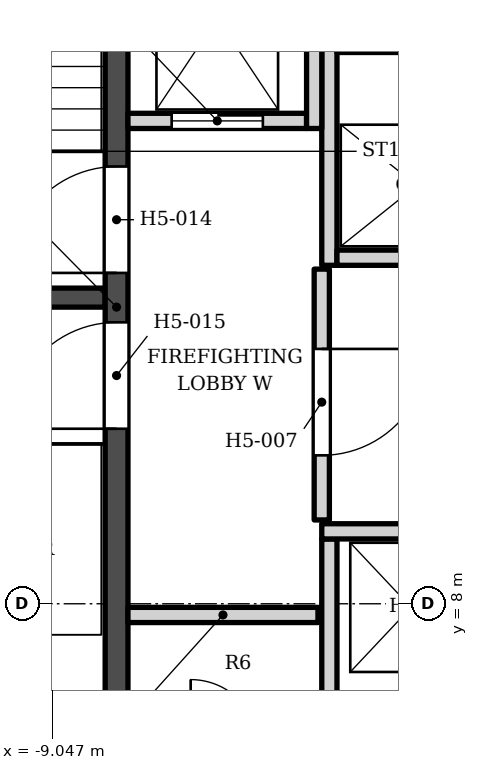
"""IFC4 building model, lengths in metres.
Left out: names, types, materials, properties, quantities, classifications, styles, units other than length and angle.
Written with IfcOpenShell. Run it as: python <this file> out.ifc"""

import sys

from ifc_helpers import new_model, si_unit, direction, frame, frame_2d, origin, place, context, subcontext, project, spatial, rectangle, extrude, element, fill, save


model = new_model("IFC4")
c1 = context("Model", 3, precision=1e-05, world=origin(), true_north=direction((0.0, 1.0)))
c2 = subcontext(c1, "Body", "Model", "MODEL_VIEW")
j1 = project(units=[si_unit("LENGTHUNIT", "METRE"), si_unit("PLANEANGLEUNIT", "RADIAN")], contexts=[c1])
p1 = place(None, origin())
s1 = spatial("IfcSite", under=j1, at=p1, CompositionType="ELEMENT")
p2 = place(p1, origin())
s2 = spatial("IfcBuilding", under=s1, at=p2, CompositionType="ELEMENT")
p3 = place(p2, frame((0.0, 0.0, 91.8)))
s3 = spatial("IfcBuildingStorey", under=s2, at=p3, CompositionType="ELEMENT", Elevation=91.8)
p4 = place(p3, frame((-8.2, 5.253, 0.0), z_axis=(0.0, 0.0, 1.0), x_axis=(0.0, 1.0, 0.0)))
e1 = element("IfcWall", 1, at=p4, inside=s3, PredefinedType="SHEAR", context=c2, shape_type="SweptSolid", body=[
    extrude(rectangle(XDim=13.3, YDim=0.3, at=frame_2d((6.65, 0.0))), origin(), (0.0, 0.0, 1.0), 3.4),
])
p5 = place(p4, frame((7.1, 0.0, 0.0)))
e2 = element("IfcOpeningElement", 2, at=p5, cuts=e1, PredefinedType="OPENING", context=c2, shape_type="SweptSolid", body=[
    extrude(rectangle(XDim=1.4, YDim=2.1, at=frame_2d((0.7, 1.05))), frame((0.0, 0.16, 0.0), z_axis=(0.0, -1.0, 0.0), x_axis=(1.0, 0.0, 0.0)), (0.0, 0.0, 1.0), 0.32),
])
p6 = place(p4, frame((5.05, 0.0, 0.0)))
e3 = element("IfcOpeningElement", 3, at=p6, cuts=e1, PredefinedType="OPENING", context=c2, shape_type="SweptSolid", body=[
    extrude(rectangle(XDim=1.4, YDim=2.1, at=frame_2d((0.7, 1.05))), frame((0.0, 0.16, 0.0), z_axis=(0.0, -1.0, 0.0), x_axis=(1.0, 0.0, 0.0)), (0.0, 0.0, 1.0), 0.32),
])
p7 = place(p3, frame((-12.1, 12.028, 0.0), z_axis=(0.0, 0.0, 1.0), x_axis=(1.0, 0.0, 0.0)))
e4 = element("IfcWall", 4, at=p7, inside=s3, PredefinedType="SHEAR", context=c2, shape_type="SweptSolid", body=[
    extrude(rectangle(XDim=3.75, YDim=0.25, at=frame_2d((1.875, 0.0))), origin(), (0.0, 0.0, 1.0), 3.4),
])
for number, where, z_axis, x_axis in (
    (5, (-5.4, 6.353, 0.0), (0.0, 0.0, 1.0), (0.0, 1.0, 0.0)),
    (6, (-8.05, 7.853, 0.0), (0.0, 0.0, 1.0), (1.0, 0.0, 0.0)),
):
    element("IfcWall", number, at=place(p3, frame(where, z_axis=z_axis, x_axis=x_axis)), inside=s3, PredefinedType="SOLIDWALL", context=c2, shape_type="SweptSolid", body=[
        extrude(rectangle(XDim=2.5, YDim=0.2, at=frame_2d((1.25, 0.0))), origin(), (0.0, 0.0, 1.0), 3.23),
    ])
p8 = place(p3, frame((-5.5, 8.953, 0.0), z_axis=(0.0, 0.0, 1.0), x_axis=(1.0, 0.0, 0.0)))
e7 = element("IfcWall", 7, at=p8, inside=s3, PredefinedType="SOLIDWALL", context=c2, shape_type="SweptSolid", body=[
    extrude(rectangle(XDim=4.5, YDim=0.2, at=frame_2d((2.25, 0.0))), origin(), (0.0, 0.0, 1.0), 3.23),
])
p9 = place(p3, frame((-5.5, 9.103, 0.0), z_axis=(0.0, 0.0, 1.0), x_axis=(0.0, 1.0, 0.0)))
e8 = element("IfcWall", 8, at=p9, inside=s3, PredefinedType="SOLIDWALL", context=c2, shape_type="SweptSolid", body=[
    extrude(rectangle(XDim=3.3, YDim=0.2, at=frame_2d((1.65, 0.0))), origin(), (0.0, 0.0, 1.0), 3.23),
])
p10 = place(p9, frame((0.85, 0.0, 0.0)))
e9 = element("IfcOpeningElement", 9, at=p10, cuts=e8, PredefinedType="OPENING", context=c2, shape_type="SweptSolid", body=[
    extrude(rectangle(XDim=1.4, YDim=2.1, at=frame_2d((0.7, 1.05))), frame((0.0, 0.11, 0.0), z_axis=(0.0, -1.0, 0.0), x_axis=(1.0, 0.0, 0.0)), (0.0, 0.0, 1.0), 0.22),
])
p11 = place(p3, frame((-5.4, 12.453, 0.0), z_axis=(0.0, 0.0, 1.0), x_axis=(0.0, 1.0, 0.0)))
e10 = element("IfcWall", 10, at=p11, inside=s3, PredefinedType="SOLIDWALL", context=c2, shape_type="SweptSolid", body=[
    extrude(rectangle(XDim=3.0, YDim=0.2, at=frame_2d((1.5, 0.0))), origin(), (0.0, 0.0, 1.0), 3.23),
])
p12 = place(p3, frame((-5.3, 12.552, 0.0), z_axis=(0.0, 0.0, 1.0), x_axis=(1.0, 0.0, 0.0)))
e11 = element("IfcWall", 11, at=p12, inside=s3, PredefinedType="SOLIDWALL", context=c2, shape_type="SweptSolid", body=[
    extrude(rectangle(XDim=2.1, YDim=0.2, at=frame_2d((1.05, 0.0))), origin(), (0.0, 0.0, 1.0), 3.23),
])
p13 = place(p3, frame((-8.05, 14.353, 0.0), z_axis=(0.0, 0.0, 1.0), x_axis=(1.0, 0.0, 0.0)))
e12 = element("IfcWall", 12, at=p13, inside=s3, PredefinedType="SOLIDWALL", context=c2, shape_type="SweptSolid", body=[
    extrude(rectangle(XDim=2.35, YDim=0.2, at=frame_2d((1.175, 0.0))), origin(), (0.0, 0.0, 1.0), 3.23),
])
p14 = place(p13, frame((0.575, 0.0, 0.0)))
e13 = element("IfcOpeningElement", 13, at=p14, cuts=e12, PredefinedType="OPENING", context=c2, shape_type="SweptSolid", body=[
    extrude(rectangle(XDim=1.2, YDim=2.1, at=frame_2d((0.6, 1.05))), frame((0.0, 0.11, 0.0), z_axis=(0.0, -1.0, 0.0), x_axis=(1.0, 0.0, 0.0)), (0.0, 0.0, 1.0), 0.22),
])
p15 = place(p3, frame((-5.6, 14.253, 0.0), z_axis=(0.0, 0.0, 1.0), x_axis=(0.0, 1.0, 0.0)))
e14 = element("IfcWall", 14, at=p15, inside=s3, PredefinedType="SOLIDWALL", context=c2, shape_type="SweptSolid", body=[
    extrude(rectangle(XDim=4.3, YDim=0.2, at=frame_2d((2.15, 0.0))), origin(), (0.0, 0.0, 1.0), 3.23),
])
p16 = place(p3, frame((-5.3, 15.353, 0.0), z_axis=(0.0, 0.0, 1.0), x_axis=(1.0, 0.0, 0.0)))
e15 = element("IfcWall", 15, at=p16, inside=s3, PredefinedType="SOLIDWALL", context=c2, shape_type="SweptSolid", body=[
    extrude(rectangle(XDim=2.1, YDim=0.2, at=frame_2d((1.05, 0.0))), origin(), (0.0, 0.0, 1.0), 3.23),
])
p17 = place(p14, origin())
e16 = element("IfcDoor", 16, at=p17, inside=s3, OperationType="DOUBLE_DOOR_SLIDING", PredefinedType="DOOR", context=c2, shape_type="SweptSolid", body=[
    extrude(rectangle(XDim=1.2, YDim=2.1, at=frame_2d((0.6, 1.05))), frame((0.0, 0.025, 0.0), z_axis=(0.0, -1.0, 0.0), x_axis=(1.0, 0.0, 0.0)), (0.0, 0.0, 1.0), 0.05),
])
fill(e13, e16)
p18 = place(p5, origin())
e17 = element("IfcDoor", 17, at=p18, inside=s3, OperationType="SINGLE_SWING_LEFT", PredefinedType="DOOR", context=c2, shape_type="SweptSolid", body=[
    extrude(rectangle(XDim=1.4, YDim=2.1, at=frame_2d((0.7, 1.05))), frame((0.0, 0.025, 0.0), z_axis=(0.0, -1.0, 0.0), x_axis=(1.0, 0.0, 0.0)), (0.0, 0.0, 1.0), 0.05),
])
fill(e2, e17)
p19 = place(p6, origin())
e18 = element("IfcDoor", 18, at=p19, inside=s3, OperationType="SINGLE_SWING_LEFT", PredefinedType="DOOR", context=c2, shape_type="SweptSolid", body=[
    extrude(rectangle(XDim=1.4, YDim=2.1, at=frame_2d((0.7, 1.05))), frame((0.0, 0.025, 0.0), z_axis=(0.0, -1.0, 0.0), x_axis=(1.0, 0.0, 0.0)), (0.0, 0.0, 1.0), 0.05),
])
fill(e3, e18)
p20 = place(p10, origin())
e19 = element("IfcDoor", 19, at=p20, inside=s3, OperationType="SINGLE_SWING_RIGHT", PredefinedType="DOOR", context=c2, shape_type="SweptSolid", body=[
    extrude(rectangle(XDim=1.4, YDim=2.1, at=frame_2d((0.7, 1.05))), frame((0.0, 0.025, 0.0), z_axis=(0.0, -1.0, 0.0), x_axis=(1.0, 0.0, 0.0)), (0.0, 0.0, 1.0), 0.05),
])
fill(e9, e19)
save(model, sys.argv[1])
